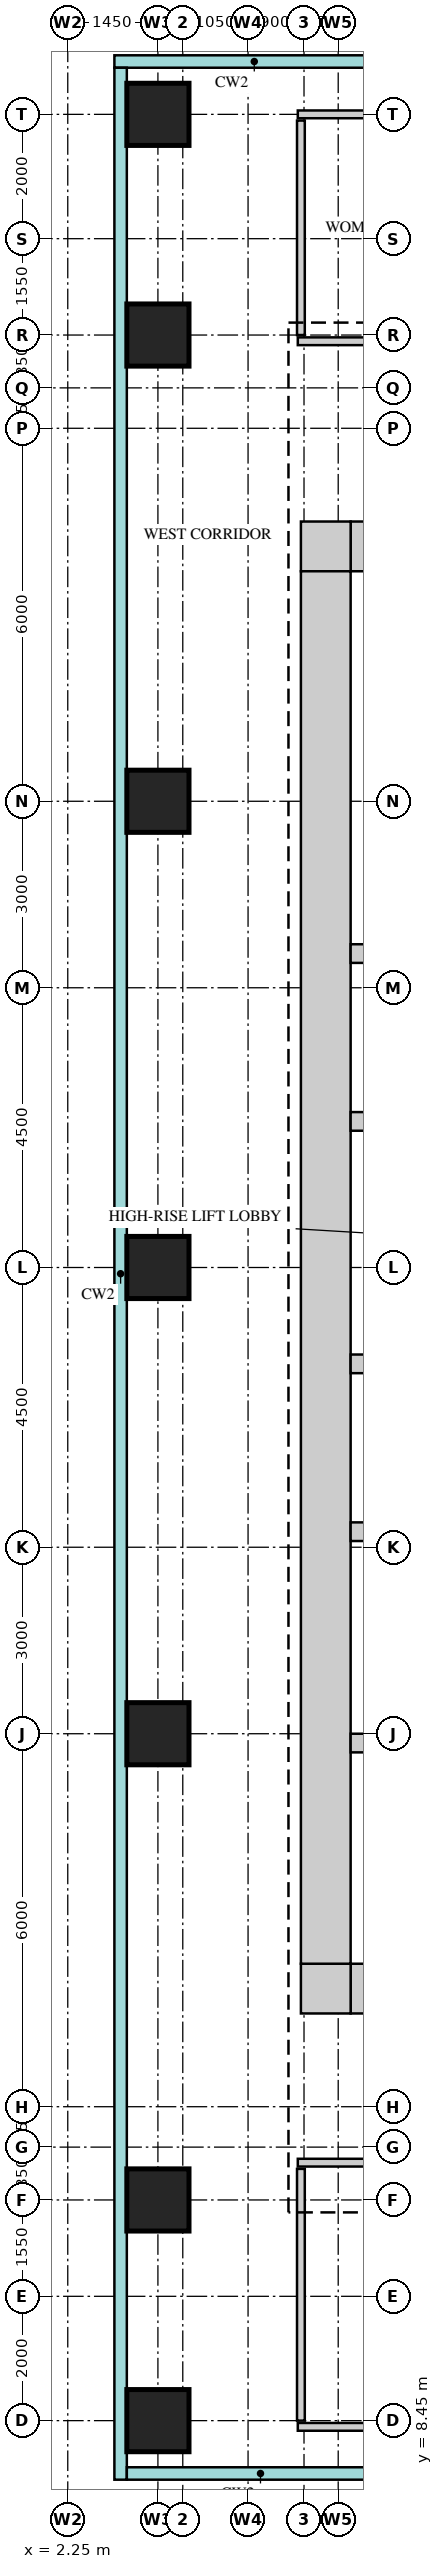
"""IFC4 building model, lengths in metres.
Left out: names, types, materials, properties, quantities, classifications, styles, units other than length and angle.
Written with IfcOpenShell. Run it as: python <this file> out.ifc"""

import sys

from ifc_helpers import new_model, si_unit, direction, frame, frame_2d, origin, origin_2d, place, context, subcontext, project, spatial, rectangle, extrude, source, transform, mapped, element, save


model = new_model("IFC4")
c1 = context("Model", 3, precision=1e-05, world=origin(), true_north=direction((0.0, 1.0)))
c2 = subcontext(c1, "Body", "Model", "MODEL_VIEW")
j1 = project(units=[si_unit("LENGTHUNIT", "METRE"), si_unit("PLANEANGLEUNIT", "RADIAN")], contexts=[c1])
p1 = place(None, origin())
s1 = spatial("IfcSite", under=j1, at=p1, CompositionType="ELEMENT")
p2 = place(p1, origin())
s2 = spatial("IfcBuilding", under=s1, at=p2, CompositionType="ELEMENT")
p3 = place(p2, frame((0.0, 0.0, 168.7)))
s3 = spatial("IfcBuildingStorey", under=s2, at=p3, CompositionType="ELEMENT", Elevation=168.7)
m1 = source(origin(), c2, "Body", "SweptSolid", [
    extrude(rectangle(XDim=13.4, YDim=0.8, at=frame_2d((6.7, 0.0))), origin(), (0.0, 0.0, 1.0), 3.75),
])
p4 = place(p3, frame((6.8, 38.6, 0.0), z_axis=(0.0, 0.0, 1.0), x_axis=(1.0, 0.0, 0.0)))
e1 = element("IfcWall", 1, at=p4, inside=s3, PredefinedType="SHEAR", context=c2, shape_type="MappedRepresentation", body=[
    mapped(m1, transform((0.0, 0.0, 0.0))),
])
m2 = source(origin(), c2, "Body", "SweptSolid", [
    extrude(rectangle(XDim=0.9, YDim=2.1, at=frame_2d((0.45, 1.05))), frame((0.0, 0.41, 0.0), z_axis=(0.0, -1.0, 0.0), x_axis=(1.0, 0.0, 0.0)), (0.0, 0.0, 1.0), 0.82),
])
p5 = place(p4, frame((2.9, 0.0, 0.0)))
e2 = element("IfcOpeningElement", 2, at=p5, cuts=e1, PredefinedType="OPENING", context=c2, shape_type="MappedRepresentation", body=[
    mapped(m2, transform((0.0, 0.0, 0.0))),
])
p6 = place(p4, frame((9.6, 0.0, 0.0)))
e3 = element("IfcOpeningElement", 3, at=p6, cuts=e1, PredefinedType="OPENING", context=c2, shape_type="MappedRepresentation", body=[
    mapped(m2, transform((0.0, 0.0, 0.0))),
])
m3 = source(origin(), c2, "Body", "SweptSolid", [
    extrude(rectangle(XDim=0.8, YDim=0.8, at=frame_2d((0.4, 0.0))), origin(), (0.0, 0.0, 1.0), 3.75),
])
p7 = place(p3, frame((6.0, 38.6, 0.0), z_axis=(0.0, 0.0, 1.0), x_axis=(1.0, 0.0, 0.0)))
e4 = element("IfcWall", 4, at=p7, inside=s3, PredefinedType="SHEAR", context=c2, shape_type="MappedRepresentation", body=[
    mapped(m3, transform((0.0, 0.0, 0.0))),
])
p8 = place(p3, frame((6.8, 15.4, 0.0), z_axis=(0.0, 0.0, 1.0), x_axis=(1.0, 0.0, 0.0)))
e5 = element("IfcWall", 5, at=p8, inside=s3, PredefinedType="SHEAR", context=c2, shape_type="MappedRepresentation", body=[
    mapped(m1, transform((0.0, 0.0, 0.0))),
])
m4 = source(origin(), c2, "Body", "SweptSolid", [
    extrude(rectangle(XDim=1.2, YDim=2.1, at=frame_2d((0.6, 1.05))), frame((0.0, 0.41, 0.0), z_axis=(0.0, -1.0, 0.0), x_axis=(1.0, 0.0, 0.0)), (0.0, 0.0, 1.0), 0.82),
])
p9 = place(p8, frame((5.4, 0.0, 0.0)))
e6 = element("IfcOpeningElement", 6, at=p9, cuts=e5, PredefinedType="OPENING", context=c2, shape_type="MappedRepresentation", body=[
    mapped(m4, transform((0.0, 0.0, 0.0))),
])
p10 = place(p8, frame((2.05, 0.0, 0.0)))
e7 = element("IfcOpeningElement", 7, at=p10, cuts=e5, PredefinedType="OPENING", context=c2, shape_type="MappedRepresentation", body=[
    mapped(m4, transform((0.0, 0.0, 0.0))),
])
m5 = source(origin(), c2, "Body", "SweptSolid", [
    extrude(rectangle(XDim=1.0, YDim=2.1, at=frame_2d((0.5, 1.05))), frame((0.0, 0.41, 0.0), z_axis=(0.0, -1.0, 0.0), x_axis=(1.0, 0.0, 0.0)), (0.0, 0.0, 1.0), 0.82),
])
p11 = place(p8, frame((7.9, 0.0, 0.0)))
e8 = element("IfcOpeningElement", 8, at=p11, cuts=e5, PredefinedType="OPENING", context=c2, shape_type="MappedRepresentation", body=[
    mapped(m5, transform((0.0, 0.0, 0.0))),
])
p12 = place(p3, frame((6.0, 15.4, 0.0), z_axis=(0.0, 0.0, 1.0), x_axis=(1.0, 0.0, 0.0)))
e9 = element("IfcWall", 9, at=p12, inside=s3, PredefinedType="SHEAR", context=c2, shape_type="MappedRepresentation", body=[
    mapped(m3, transform((0.0, 0.0, 0.0))),
])
m6 = source(origin(), c2, "Body", "SweptSolid", [
    extrude(rectangle(XDim=22.4, YDim=0.8, at=frame_2d((11.2, 0.0))), origin(), (0.0, 0.0, 1.0), 3.75),
])
p13 = place(p3, frame((6.4, 15.8, 0.0), z_axis=(0.0, 0.0, 1.0), x_axis=(0.0, 1.0, 0.0)))
e10 = element("IfcWall", 10, at=p13, inside=s3, PredefinedType="SHEAR", context=c2, shape_type="MappedRepresentation", body=[
    mapped(m6, transform((0.0, 0.0, 0.0))),
])
m7 = source(origin(), c2, "Body", "SweptSolid", [
    extrude(rectangle(XDim=13.4, YDim=0.3, at=frame_2d((6.7, 0.0))), origin(), (0.0, 0.0, 1.0), 3.75),
])
p14 = place(p3, frame((6.8, 22.75, 0.0), z_axis=(0.0, 0.0, 1.0), x_axis=(1.0, 0.0, 0.0)))
e11 = element("IfcWall", 11, at=p14, inside=s3, PredefinedType="STANDARD", context=c2, shape_type="MappedRepresentation", body=[
    mapped(m7, transform((0.0, 0.0, 0.0))),
])
m8 = source(origin(), c2, "Body", "SweptSolid", [
    extrude(rectangle(XDim=9.275, YDim=0.3, at=frame_2d((4.637, 0.0))), origin(), (0.0, 0.0, 1.0), 3.75),
])
p15 = place(p3, frame((6.8, 19.35, 0.0), z_axis=(0.0, 0.0, 1.0), x_axis=(1.0, 0.0, 0.0)))
e12 = element("IfcWall", 12, at=p15, inside=s3, PredefinedType="STANDARD", context=c2, shape_type="MappedRepresentation", body=[
    mapped(m8, transform((0.0, 0.0, 0.0))),
])
m9 = source(origin(), c2, "Body", "SweptSolid", [
    extrude(rectangle(XDim=1.2, YDim=2.1, at=frame_2d((0.6, 1.05))), frame((0.0, 0.16, 0.0), z_axis=(0.0, -1.0, 0.0), x_axis=(1.0, 0.0, 0.0)), (0.0, 0.0, 1.0), 0.32),
])
p16 = place(p15, frame((0.85, 0.0, 0.0)))
e13 = element("IfcOpeningElement", 13, at=p16, cuts=e12, PredefinedType="OPENING", context=c2, shape_type="MappedRepresentation", body=[
    mapped(m9, transform((0.0, 0.0, 0.0))),
])
p17 = place(p15, frame((3.2, 0.0, 0.0)))
e14 = element("IfcOpeningElement", 14, at=p17, cuts=e12, PredefinedType="OPENING", context=c2, shape_type="MappedRepresentation", body=[
    mapped(m9, transform((0.0, 0.0, 0.0))),
])
p18 = place(p15, frame((5.45, 0.0, 0.0)))
e15 = element("IfcOpeningElement", 15, at=p18, cuts=e12, PredefinedType="OPENING", context=c2, shape_type="MappedRepresentation", body=[
    mapped(m9, transform((0.0, 0.0, 0.0))),
])
p19 = place(p15, frame((7.6, 0.0, 0.0)))
e16 = element("IfcOpeningElement", 16, at=p19, cuts=e12, PredefinedType="OPENING", context=c2, shape_type="MappedRepresentation", body=[
    mapped(m9, transform((0.0, 0.0, 0.0))),
])
p20 = place(p3, frame((6.8, 32.05, 0.0), z_axis=(0.0, 0.0, 1.0), x_axis=(1.0, 0.0, 0.0)))
e17 = element("IfcWall", 17, at=p20, inside=s3, PredefinedType="STANDARD", context=c2, shape_type="MappedRepresentation", body=[
    mapped(m7, transform((0.0, 0.0, 0.0))),
])
p21 = place(p3, frame((6.8, 29.35, 0.0), z_axis=(0.0, 0.0, 1.0), x_axis=(1.0, 0.0, 0.0)))
e18 = element("IfcWall", 18, at=p21, inside=s3, PredefinedType="STANDARD", context=c2, shape_type="MappedRepresentation", body=[
    mapped(m7, transform((0.0, 0.0, 0.0))),
])
p22 = place(p21, frame((0.95, 0.0, 0.0)))
e19 = element("IfcOpeningElement", 19, at=p22, cuts=e18, PredefinedType="OPENING", context=c2, shape_type="MappedRepresentation", body=[
    mapped(m9, transform((0.0, 0.0, 0.0))),
])
p23 = place(p21, frame((3.5, 0.0, 0.0)))
e20 = element("IfcOpeningElement", 20, at=p23, cuts=e18, PredefinedType="OPENING", context=c2, shape_type="MappedRepresentation", body=[
    mapped(m9, transform((0.0, 0.0, 0.0))),
])
p24 = place(p21, frame((6.05, 0.0, 0.0)))
e21 = element("IfcOpeningElement", 21, at=p24, cuts=e18, PredefinedType="OPENING", context=c2, shape_type="MappedRepresentation", body=[
    mapped(m9, transform((0.0, 0.0, 0.0))),
])
p25 = place(p21, frame((8.6, 0.0, 0.0)))
e22 = element("IfcOpeningElement", 22, at=p25, cuts=e18, PredefinedType="OPENING", context=c2, shape_type="MappedRepresentation", body=[
    mapped(m9, transform((0.0, 0.0, 0.0))),
])
p26 = place(p21, frame((11.15, 0.0, 0.0)))
e23 = element("IfcOpeningElement", 23, at=p26, cuts=e18, PredefinedType="OPENING", context=c2, shape_type="MappedRepresentation", body=[
    mapped(m9, transform((0.0, 0.0, 0.0))),
])
p27 = place(p3, frame((6.8, 25.45, 0.0), z_axis=(0.0, 0.0, 1.0), x_axis=(1.0, 0.0, 0.0)))
e24 = element("IfcWall", 24, at=p27, inside=s3, PredefinedType="STANDARD", context=c2, shape_type="MappedRepresentation", body=[
    mapped(m7, transform((0.0, 0.0, 0.0))),
])
p28 = place(p27, frame((0.95, 0.0, 0.0)))
e25 = element("IfcOpeningElement", 25, at=p28, cuts=e24, PredefinedType="OPENING", context=c2, shape_type="MappedRepresentation", body=[
    mapped(m9, transform((0.0, 0.0, 0.0))),
])
p29 = place(p27, frame((3.5, 0.0, 0.0)))
e26 = element("IfcOpeningElement", 26, at=p29, cuts=e24, PredefinedType="OPENING", context=c2, shape_type="MappedRepresentation", body=[
    mapped(m9, transform((0.0, 0.0, 0.0))),
])
p30 = place(p27, frame((6.05, 0.0, 0.0)))
e27 = element("IfcOpeningElement", 27, at=p30, cuts=e24, PredefinedType="OPENING", context=c2, shape_type="MappedRepresentation", body=[
    mapped(m9, transform((0.0, 0.0, 0.0))),
])
p31 = place(p27, frame((8.6, 0.0, 0.0)))
e28 = element("IfcOpeningElement", 28, at=p31, cuts=e24, PredefinedType="OPENING", context=c2, shape_type="MappedRepresentation", body=[
    mapped(m9, transform((0.0, 0.0, 0.0))),
])
p32 = place(p27, frame((11.15, 0.0, 0.0)))
e29 = element("IfcOpeningElement", 29, at=p32, cuts=e24, PredefinedType="OPENING", context=c2, shape_type="MappedRepresentation", body=[
    mapped(m9, transform((0.0, 0.0, 0.0))),
])
m10 = source(origin(), c2, "Body", "SweptSolid", [
    extrude(rectangle(XDim=1.0, YDim=1.0, at=origin_2d()), origin(), (0.0, 0.0, 1.0), 3.75),
])
for number, where, z_axis, x_axis in (
    (30, (3.7, 8.45, 0.0), (0.0, 0.0, 1.0), (1.0, 0.0, 0.0)),
    (31, (3.7, 12.0, 0.0), (0.0, 0.0, 1.0), (1.0, 0.0, 0.0)),
    (32, (3.7, 19.5, 0.0), (0.0, 0.0, 1.0), (1.0, 0.0, 0.0)),
    (33, (3.7, 27.0, 0.0), (0.0, 0.0, 1.0), (1.0, 0.0, 0.0)),
    (34, (3.7, 34.5, 0.0), (0.0, 0.0, 1.0), (1.0, 0.0, 0.0)),
    (35, (3.7, 42.0, 0.0), (0.0, 0.0, 1.0), (1.0, 0.0, 0.0)),
    (36, (3.7, 45.55, 0.0), (0.0, 0.0, 1.0), (1.0, 0.0, 0.0)),
):
    element("IfcColumn", number, at=place(p3, frame(where, z_axis=z_axis, x_axis=x_axis)), inside=s3, PredefinedType="COLUMN", context=c2, shape_type="MappedRepresentation", body=[
        mapped(m10, transform((0.0, 0.0, 0.0))),
    ])
m11 = source(origin(), c2, "Body", "SweptSolid", [
    extrude(rectangle(XDim=7.95, YDim=0.125, at=frame_2d((3.975, 0.0))), origin(), (0.0, 0.0, 1.0), 3.25),
])
p33 = place(p3, frame((5.95, 8.35, 0.0), z_axis=(0.0, 0.0, 1.0), x_axis=(1.0, 0.0, 0.0)))
e37 = element("IfcWall", 37, at=p33, inside=s3, PredefinedType="PARTITIONING", context=c2, shape_type="MappedRepresentation", body=[
    mapped(m11, transform((0.0, 0.0, 0.0))),
])
m12 = source(origin(), c2, "Body", "SweptSolid", [
    extrude(rectangle(XDim=0.9, YDim=2.1, at=frame_2d((0.45, 1.05))), frame((0.0, 0.073, 0.0), z_axis=(0.0, -1.0, 0.0), x_axis=(1.0, 0.0, 0.0)), (0.0, 0.0, 1.0), 0.145),
])
p34 = place(p33, frame((3.8, 0.0, 0.0)))
e38 = element("IfcOpeningElement", 38, at=p34, cuts=e37, PredefinedType="OPENING", context=c2, shape_type="MappedRepresentation", body=[
    mapped(m12, transform((0.0, 0.0, 0.0))),
])
m13 = source(origin(), c2, "Body", "SweptSolid", [
    extrude(rectangle(XDim=4.05, YDim=0.125, at=frame_2d((2.025, 0.0))), origin(), (0.0, 0.0, 1.0), 3.8),
])
p35 = place(p3, frame((6.0, 8.45, 0.0), z_axis=(0.0, 0.0, 1.0), x_axis=(0.0, 1.0, 0.0)))
e39 = element("IfcWall", 39, at=p35, inside=s3, PredefinedType="PARTITIONING", context=c2, shape_type="MappedRepresentation", body=[
    mapped(m13, transform((0.0, 0.0, 0.0))),
])
m14 = source(origin(), c2, "Body", "SweptSolid", [
    extrude(rectangle(XDim=8.0, YDim=0.125, at=frame_2d((4.0, 0.0))), origin(), (0.0, 0.0, 1.0), 3.8),
])
p36 = place(p3, frame((5.95, 12.6, 0.0), z_axis=(0.0, 0.0, 1.0), x_axis=(1.0, 0.0, 0.0)))
e40 = element("IfcWall", 40, at=p36, inside=s3, PredefinedType="PARTITIONING", context=c2, shape_type="MappedRepresentation", body=[
    mapped(m14, transform((0.0, 0.0, 0.0))),
])
m15 = source(origin(), c2, "Body", "SweptSolid", [
    extrude(rectangle(XDim=7.95, YDim=0.125, at=frame_2d((3.975, 0.0))), origin(), (0.0, 0.0, 1.0), 3.8),
])
p37 = place(p3, frame((5.95, 41.9, 0.0), z_axis=(0.0, 0.0, 1.0), x_axis=(1.0, 0.0, 0.0)))
e41 = element("IfcWall", 41, at=p37, inside=s3, PredefinedType="PARTITIONING", context=c2, shape_type="MappedRepresentation", body=[
    mapped(m15, transform((0.0, 0.0, 0.0))),
])
p38 = place(p37, frame((1.55, 0.0, 0.0)))
e42 = element("IfcOpeningElement", 42, at=p38, cuts=e41, PredefinedType="OPENING", context=c2, shape_type="MappedRepresentation", body=[
    mapped(m12, transform((0.0, 0.0, 0.0))),
])
p39 = place(p37, frame((5.65, 0.0, 0.0)))
e43 = element("IfcOpeningElement", 43, at=p39, cuts=e41, PredefinedType="OPENING", context=c2, shape_type="MappedRepresentation", body=[
    mapped(m12, transform((0.0, 0.0, 0.0))),
])
m16 = source(origin(), c2, "Body", "SweptSolid", [
    extrude(rectangle(XDim=3.45, YDim=0.125, at=frame_2d((1.725, 0.0))), origin(), (0.0, 0.0, 1.0), 3.8),
])
p40 = place(p3, frame((6.0, 42.0, 0.0), z_axis=(0.0, 0.0, 1.0), x_axis=(0.0, 1.0, 0.0)))
e44 = element("IfcWall", 44, at=p40, inside=s3, PredefinedType="PARTITIONING", context=c2, shape_type="MappedRepresentation", body=[
    mapped(m16, transform((0.0, 0.0, 0.0))),
])
p41 = place(p3, frame((5.95, 45.55, 0.0), z_axis=(0.0, 0.0, 1.0), x_axis=(1.0, 0.0, 0.0)))
e45 = element("IfcWall", 45, at=p41, inside=s3, PredefinedType="PARTITIONING", context=c2, shape_type="MappedRepresentation", body=[
    mapped(m11, transform((0.0, 0.0, 0.0))),
])
save(model, sys.argv[1])
